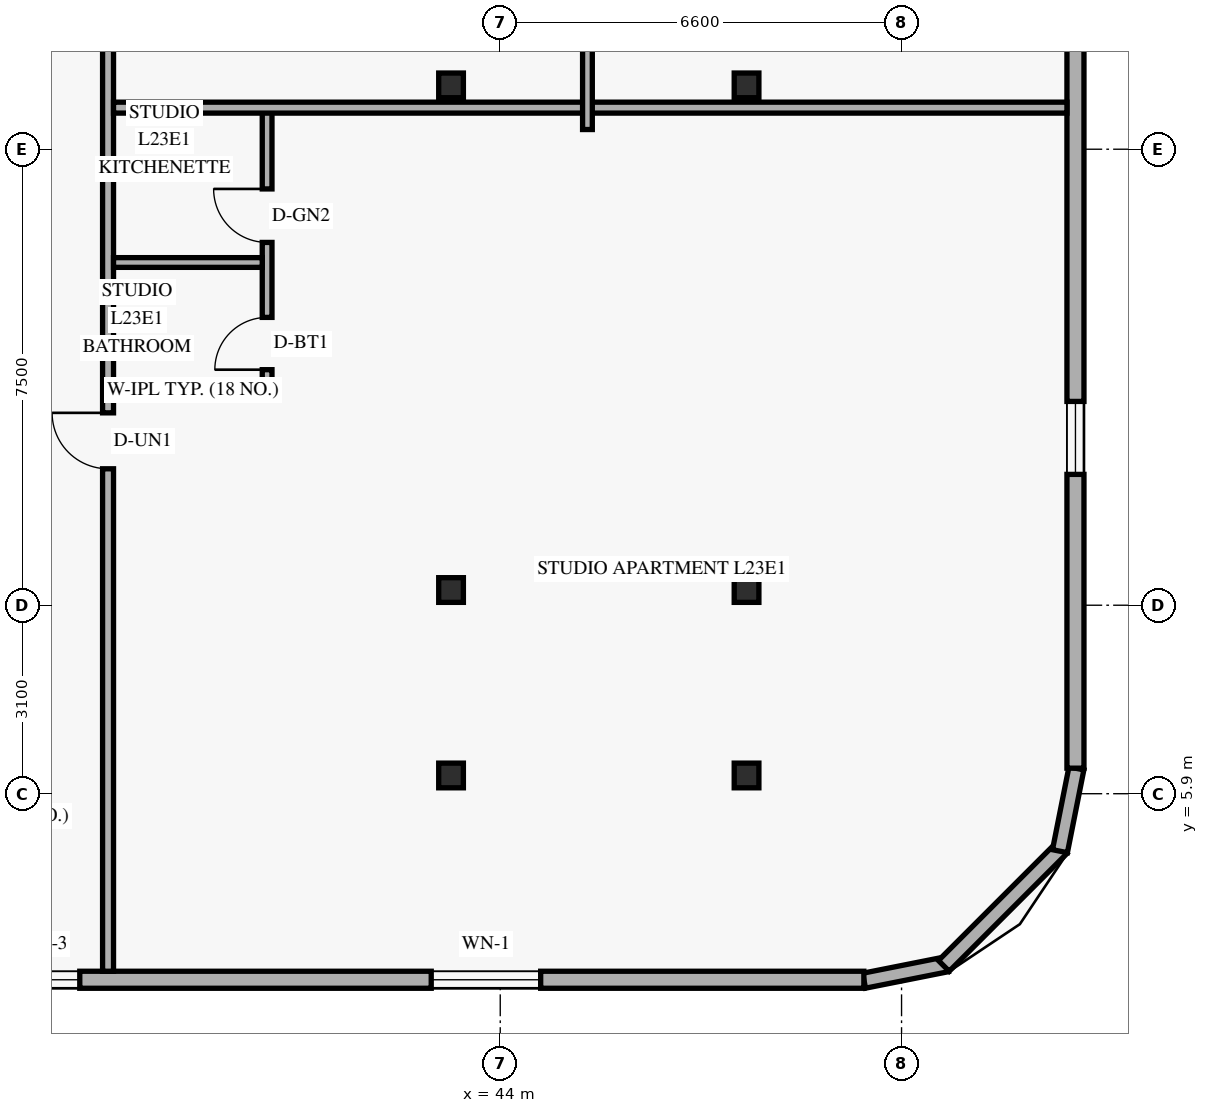
"""IFC4 building model, lengths in metres.
Left out: names, types, materials, properties, quantities, classifications, styles, units other than length and angle.
Written with IfcOpenShell. Run it as: python <this file> out.ifc"""

import sys

from ifc_helpers import new_model, si_unit, direction, frame, frame_2d, origin, origin_2d, place, context, subcontext, project, spatial, rectangle, hollow_rectangle, extrude, element, fill, save


model = new_model("IFC4")
c1 = context("Model", 3, precision=1e-05, world=origin(), true_north=direction((0.0, 1.0)))
c2 = subcontext(c1, "Body", "Model", "MODEL_VIEW")
j1 = project(units=[si_unit("LENGTHUNIT", "METRE"), si_unit("PLANEANGLEUNIT", "RADIAN")], contexts=[c1])
p1 = place(None, origin())
s1 = spatial("IfcSite", under=j1, at=p1, CompositionType="ELEMENT")
p2 = place(p1, origin())
s2 = spatial("IfcBuilding", under=s1, at=p2, CompositionType="ELEMENT")
p3 = place(p2, frame((0.0, 0.0, 91.2)))
s3 = spatial("IfcBuildingStorey", under=s2, at=p3, CompositionType="ELEMENT", Elevation=91.2)
for number, where, z_axis, x_axis in (
    (1, (43.128, 6.2, 0.0), (0.035, 0.0, 0.999), (0.0, 1.0, 0.0)),
    (2, (43.128, 9.25, 0.0), (0.035, 0.0, 0.999), (0.0, 1.0, 0.0)),
    (3, (43.128, 17.55, 0.0), (0.035, 0.0, 0.999), (0.0, 1.0, 0.0)),
):
    element("IfcColumn", number, at=place(p3, frame(where, z_axis=z_axis, x_axis=x_axis)), inside=s3, PredefinedType="COLUMN", context=c2, shape_type="SweptSolid", body=[
        extrude(hollow_rectangle(XDim=0.406, YDim=0.406, WallThickness=0.016, at=origin_2d()), origin(), (0.0, 0.0, 1.0), 3.602),
    ])
for number, where, z_axis, x_axis in (
    (4, (47.946, 6.2, 0.0), (0.058, 0.0, 0.998), (0.0, 1.0, 0.0)),
    (5, (47.946, 9.25, 0.0), (0.058, 0.0, 0.998), (0.0, 1.0, 0.0)),
    (6, (47.946, 17.55, 0.0), (0.058, 0.0, 0.998), (0.0, 1.0, 0.0)),
):
    element("IfcColumn", number, at=place(p3, frame(where, z_axis=z_axis, x_axis=x_axis)), inside=s3, PredefinedType="COLUMN", context=c2, shape_type="SweptSolid", body=[
        extrude(hollow_rectangle(XDim=0.406, YDim=0.406, WallThickness=0.016, at=origin_2d()), origin(), (0.0, 0.0, 1.0), 3.606),
    ])
p4 = place(p3, frame((49.983, 2.824, 0.0), z_axis=(0.0, 0.0, 1.0), x_axis=(0.980809899341, 0.19496651342, 0.0)))
e7 = element("IfcWall", 7, at=p4, inside=s3, PredefinedType="SOLIDWALL", context=c2, shape_type="SweptSolid", body=[
    extrude(rectangle(XDim=1.389, YDim=0.25, at=frame_2d((0.694, 0.0))), origin(), (0.0, 0.0, 1.0), 3.36),
])
p5 = place(p3, frame((51.295, 3.068, 0.0), z_axis=(0.0, 0.0, 1.0), x_axis=(0.707151344399, 0.707062215165, 0.0)))
e8 = element("IfcWall", 8, at=p5, inside=s3, PredefinedType="SOLIDWALL", context=c2, shape_type="SweptSolid", body=[
    extrude(rectangle(XDim=2.739, YDim=0.25, at=frame_2d((1.37, 0.0))), origin(), (0.0, 0.0, 1.0), 3.36),
])
p6 = place(p3, frame((53.205, 4.955, 0.0), z_axis=(0.0, 0.0, 1.0), x_axis=(0.195000137217, 0.980803214965, 0.0)))
e9 = element("IfcWall", 9, at=p6, inside=s3, PredefinedType="SOLIDWALL", context=c2, shape_type="SweptSolid", body=[
    extrude(rectangle(XDim=1.388, YDim=0.25, at=frame_2d((0.694, 0.0))), origin(), (0.0, 0.0, 1.0), 3.36),
])
p7 = place(p3, frame((13.42, 2.84, 0.0), z_axis=(0.0, 0.0, 1.0), x_axis=(1.0, 0.0, 0.0)))
e10 = element("IfcWall", 10, at=p7, inside=s3, PredefinedType="SOLIDWALL", context=c2, shape_type="SweptSolid", body=[
    extrude(rectangle(XDim=36.56, YDim=0.28, at=frame_2d((18.28, 0.0))), origin(), (0.0, 0.0, 1.0), 3.36),
])
p8 = place(p7, frame((3.215, 0.0, 0.85)))
e11 = element("IfcOpeningElement", 11, at=p8, cuts=e10, PredefinedType="OPENING", context=c2, shape_type="SweptSolid", body=[
    extrude(rectangle(XDim=1.8, YDim=1.6, at=frame_2d((0.9, 0.8))), frame((0.0, 0.15, 0.0), z_axis=(0.0, -1.0, 0.0), x_axis=(1.0, 0.0, 0.0)), (0.0, 0.0, 1.0), 0.3),
])
p9 = place(p7, frame((8.68, 0.0, 0.85)))
e12 = element("IfcOpeningElement", 12, at=p9, cuts=e10, PredefinedType="OPENING", context=c2, shape_type="SweptSolid", body=[
    extrude(rectangle(XDim=1.2, YDim=1.5, at=frame_2d((0.6, 0.75))), frame((0.0, 0.15, 0.0), z_axis=(0.0, -1.0, 0.0), x_axis=(1.0, 0.0, 0.0)), (0.0, 0.0, 1.0), 0.3),
])
p10 = place(p7, frame((12.172, 0.0, 0.85)))
e13 = element("IfcOpeningElement", 13, at=p10, cuts=e10, PredefinedType="OPENING", context=c2, shape_type="SweptSolid", body=[
    extrude(rectangle(XDim=1.8, YDim=1.6, at=frame_2d((0.9, 0.8))), frame((0.0, 0.15, 0.0), z_axis=(0.0, -1.0, 0.0), x_axis=(1.0, 0.0, 0.0)), (0.0, 0.0, 1.0), 0.3),
])
p11 = place(p7, frame((18.008, 0.0, 0.85)))
e14 = element("IfcOpeningElement", 14, at=p11, cuts=e10, PredefinedType="OPENING", context=c2, shape_type="SweptSolid", body=[
    extrude(rectangle(XDim=1.8, YDim=1.6, at=frame_2d((0.9, 0.8))), frame((0.0, 0.15, 0.0), z_axis=(0.0, -1.0, 0.0), x_axis=(1.0, 0.0, 0.0)), (0.0, 0.0, 1.0), 0.3),
])
p12 = place(p7, frame((22.465, 0.0, 0.85)))
e15 = element("IfcOpeningElement", 15, at=p12, cuts=e10, PredefinedType="OPENING", context=c2, shape_type="SweptSolid", body=[
    extrude(rectangle(XDim=1.2, YDim=1.5, at=frame_2d((0.6, 0.75))), frame((0.0, 0.15, 0.0), z_axis=(0.0, -1.0, 0.0), x_axis=(1.0, 0.0, 0.0)), (0.0, 0.0, 1.0), 0.3),
])
p13 = place(p7, frame((29.445, 0.0, 0.85)))
e16 = element("IfcOpeningElement", 16, at=p13, cuts=e10, PredefinedType="OPENING", context=c2, shape_type="SweptSolid", body=[
    extrude(rectangle(XDim=1.8, YDim=1.6, at=frame_2d((0.9, 0.8))), frame((0.0, 0.15, 0.0), z_axis=(0.0, -1.0, 0.0), x_axis=(1.0, 0.0, 0.0)), (0.0, 0.0, 1.0), 0.3),
])
p14 = place(p3, frame((53.46, 6.32, 0.0), z_axis=(0.0, 0.0, 1.0), x_axis=(0.0, 1.0, 0.0)))
e17 = element("IfcWall", 17, at=p14, inside=s3, PredefinedType="SOLIDWALL", context=c2, shape_type="SweptSolid", body=[
    extrude(rectangle(XDim=35.36, YDim=0.28, at=frame_2d((17.68, 0.0))), origin(), (0.0, 0.0, 1.0), 3.36),
])
p15 = place(p14, frame((4.832, 0.0, 0.85)))
e18 = element("IfcOpeningElement", 18, at=p15, cuts=e17, PredefinedType="OPENING", context=c2, shape_type="SweptSolid", body=[
    extrude(rectangle(XDim=1.2, YDim=1.5, at=frame_2d((0.6, 0.75))), frame((0.0, 0.15, 0.0), z_axis=(0.0, -1.0, 0.0), x_axis=(1.0, 0.0, 0.0)), (0.0, 0.0, 1.0), 0.3),
])
p16 = place(p14, frame((15.511, 0.0, 0.85)))
e19 = element("IfcOpeningElement", 19, at=p16, cuts=e17, PredefinedType="OPENING", context=c2, shape_type="SweptSolid", body=[
    extrude(rectangle(XDim=1.2, YDim=1.5, at=frame_2d((0.6, 0.75))), frame((0.0, 0.15, 0.0), z_axis=(0.0, -1.0, 0.0), x_axis=(1.0, 0.0, 0.0)), (0.0, 0.0, 1.0), 0.3),
])
p17 = place(p14, frame((22.753, 0.0, 0.85)))
e20 = element("IfcOpeningElement", 20, at=p17, cuts=e17, PredefinedType="OPENING", context=c2, shape_type="SweptSolid", body=[
    extrude(rectangle(XDim=1.2, YDim=1.5, at=frame_2d((0.6, 0.75))), frame((0.0, 0.15, 0.0), z_axis=(0.0, -1.0, 0.0), x_axis=(1.0, 0.0, 0.0)), (0.0, 0.0, 1.0), 0.3),
])
p18 = place(p14, frame((29.754, 0.0, 0.85)))
e21 = element("IfcOpeningElement", 21, at=p18, cuts=e17, PredefinedType="OPENING", context=c2, shape_type="SweptSolid", body=[
    extrude(rectangle(XDim=1.2, YDim=1.5, at=frame_2d((0.6, 0.75))), frame((0.0, 0.15, 0.0), z_axis=(0.0, -1.0, 0.0), x_axis=(1.0, 0.0, 0.0)), (0.0, 0.0, 1.0), 0.3),
])
p19 = place(p3, frame((37.55, 2.98, 0.0), z_axis=(0.0, 0.0, 1.0), x_axis=(0.0, 1.0, 0.0)))
e22 = element("IfcWall", 22, at=p19, inside=s3, PredefinedType="STANDARD", context=c2, shape_type="SweptSolid", body=[
    extrude(rectangle(XDim=42.04, YDim=0.18, at=frame_2d((21.02, 0.0))), origin(), (0.0, 0.0, 1.0), 2.731),
])
p20 = place(p19, frame((8.264, 0.0, 0.0)))
e23 = element("IfcOpeningElement", 23, at=p20, cuts=e22, PredefinedType="OPENING", context=c2, shape_type="SweptSolid", body=[
    extrude(rectangle(XDim=0.92, YDim=2.15, at=frame_2d((0.46, 1.075))), frame((0.0, 0.1, 0.0), z_axis=(0.0, -1.0, 0.0), x_axis=(1.0, 0.0, 0.0)), (0.0, 0.0, 1.0), 0.2),
])
p21 = place(p19, frame((18.691, 0.0, 0.0)))
e24 = element("IfcOpeningElement", 24, at=p21, cuts=e22, PredefinedType="OPENING", context=c2, shape_type="SweptSolid", body=[
    extrude(rectangle(XDim=0.92, YDim=2.15, at=frame_2d((0.46, 1.075))), frame((0.0, 0.1, 0.0), z_axis=(0.0, -1.0, 0.0), x_axis=(1.0, 0.0, 0.0)), (0.0, 0.0, 1.0), 0.2),
])
p22 = place(p19, frame((32.494, 0.0, 0.0)))
e25 = element("IfcOpeningElement", 25, at=p22, cuts=e22, PredefinedType="OPENING", context=c2, shape_type="SweptSolid", body=[
    extrude(rectangle(XDim=0.92, YDim=2.15, at=frame_2d((0.46, 1.075))), frame((0.0, 0.1, 0.0), z_axis=(0.0, -1.0, 0.0), x_axis=(1.0, 0.0, 0.0)), (0.0, 0.0, 1.0), 0.2),
])
p23 = place(p3, frame((37.64, 12.544, 0.0), z_axis=(0.0, 0.0, 1.0), x_axis=(1.0, 0.0, 0.0)))
e26 = element("IfcWall", 26, at=p23, inside=s3, PredefinedType="PLUMBINGWALL", context=c2, shape_type="SweptSolid", body=[
    extrude(rectangle(XDim=2.606, YDim=0.16, at=frame_2d((1.303, 0.0))), origin(), (0.0, 0.0, 1.0), 3.36),
])
p24 = place(p3, frame((40.166, 12.454, 0.0), z_axis=(0.0, 0.0, 1.0), x_axis=(0.0, 1.0, 0.0)))
e27 = element("IfcWall", 27, at=p24, inside=s3, PredefinedType="PLUMBINGWALL", context=c2, shape_type="SweptSolid", body=[
    extrude(rectangle(XDim=4.73, YDim=0.16, at=frame_2d((2.365, 0.0))), origin(), (0.0, 0.0, 1.0), 2.988),
])
p25 = place(p24, frame((0.42, 0.0, 0.0)))
e28 = element("IfcOpeningElement", 28, at=p25, cuts=e27, PredefinedType="OPENING", context=c2, shape_type="SweptSolid", body=[
    extrude(rectangle(XDim=0.86, YDim=2.12, at=frame_2d((0.43, 1.06))), frame((0.0, 0.09, 0.0), z_axis=(0.0, -1.0, 0.0), x_axis=(1.0, 0.0, 0.0)), (0.0, 0.0, 1.0), 0.18),
])
p26 = place(p24, frame((2.513, 0.0, 0.0)))
e29 = element("IfcOpeningElement", 29, at=p26, cuts=e27, PredefinedType="OPENING", context=c2, shape_type="SweptSolid", body=[
    extrude(rectangle(XDim=0.88, YDim=2.12, at=frame_2d((0.44, 1.06))), frame((0.0, 0.09, 0.0), z_axis=(0.0, -1.0, 0.0), x_axis=(1.0, 0.0, 0.0)), (0.0, 0.0, 1.0), 0.18),
])
p27 = place(p3, frame((37.64, 14.637, 0.0), z_axis=(0.0, 0.0, 1.0), x_axis=(1.0, 0.0, 0.0)))
e30 = element("IfcWall", 30, at=p27, inside=s3, PredefinedType="PLUMBINGWALL", context=c2, shape_type="SweptSolid", body=[
    extrude(rectangle(XDim=2.446, YDim=0.16, at=frame_2d((1.223, 0.0))), origin(), (0.0, 0.0, 1.0), 3.36),
])
p28 = place(p3, frame((37.64, 17.184, 0.0), z_axis=(0.0, 0.0, 1.0), x_axis=(1.0, 0.0, 0.0)))
e31 = element("IfcWall", 31, at=p28, inside=s3, PredefinedType="PARTITIONING", context=c2, shape_type="SweptSolid", body=[
    extrude(rectangle(XDim=15.68, YDim=0.18, at=frame_2d((7.84, 0.0))), origin(), (0.0, 0.0, 1.0), 2.731),
])
p29 = place(p3, frame((45.434, 16.824, 0.0), z_axis=(0.0, 0.0, 1.0), x_axis=(0.0, 1.0, 0.0)))
e32 = element("IfcWall", 32, at=p29, inside=s3, PredefinedType="PARTITIONING", context=c2, shape_type="SweptSolid", body=[
    extrude(rectangle(XDim=10.934, YDim=0.16, at=frame_2d((5.467, 0.0))), origin(), (0.0, 0.0, 1.0), 2.731),
])
p30 = place(p29, frame((4.707, 0.0, 0.0)))
e33 = element("IfcOpeningElement", 33, at=p30, cuts=e32, PredefinedType="OPENING", context=c2, shape_type="SweptSolid", body=[
    extrude(rectangle(XDim=0.95, YDim=2.15, at=frame_2d((0.475, 1.075))), frame((0.0, 0.09, 0.0), z_axis=(0.0, -1.0, 0.0), x_axis=(1.0, 0.0, 0.0)), (0.0, 0.0, 1.0), 0.18),
])
p31 = place(p12, origin())
e34 = element("IfcWindow", 34, at=p31, inside=s3, PartitioningType="SINGLE_PANEL", PredefinedType="WINDOW", context=c2, shape_type="SweptSolid", body=[
    extrude(rectangle(XDim=1.2, YDim=1.5, at=frame_2d((0.6, 0.75))), frame((0.0, 0.03, 0.0), z_axis=(0.0, -1.0, 0.0), x_axis=(1.0, 0.0, 0.0)), (0.0, 0.0, 1.0), 0.06),
])
fill(e15, e34)
p32 = place(p13, origin())
e35 = element("IfcWindow", 35, at=p32, inside=s3, PartitioningType="SINGLE_PANEL", PredefinedType="WINDOW", context=c2, shape_type="SweptSolid", body=[
    extrude(rectangle(XDim=1.8, YDim=1.6, at=frame_2d((0.9, 0.8))), frame((0.0, 0.03, 0.0), z_axis=(0.0, -1.0, 0.0), x_axis=(1.0, 0.0, 0.0)), (0.0, 0.0, 1.0), 0.06),
])
fill(e16, e35)
p33 = place(p15, origin())
e36 = element("IfcWindow", 36, at=p33, inside=s3, PartitioningType="SINGLE_PANEL", PredefinedType="WINDOW", context=c2, shape_type="SweptSolid", body=[
    extrude(rectangle(XDim=1.2, YDim=1.5, at=frame_2d((0.6, 0.75))), frame((0.0, 0.03, 0.0), z_axis=(0.0, -1.0, 0.0), x_axis=(1.0, 0.0, 0.0)), (0.0, 0.0, 1.0), 0.06),
])
fill(e18, e36)
p34 = place(p20, origin())
e37 = element("IfcDoor", 37, at=p34, inside=s3, OperationType="SINGLE_SWING_RIGHT", PredefinedType="DOOR", context=c2, shape_type="SweptSolid", body=[
    extrude(rectangle(XDim=0.92, YDim=2.15, at=frame_2d((0.46, 1.075))), frame((0.0, 0.025, 0.0), z_axis=(0.0, -1.0, 0.0), x_axis=(1.0, 0.0, 0.0)), (0.0, 0.0, 1.0), 0.05),
])
fill(e23, e37)
p35 = place(p25, origin())
e38 = element("IfcDoor", 38, at=p35, inside=s3, OperationType="SINGLE_SWING_LEFT", PredefinedType="DOOR", context=c2, shape_type="SweptSolid", body=[
    extrude(rectangle(XDim=0.86, YDim=2.12, at=frame_2d((0.43, 1.06))), frame((0.0, 0.025, 0.0), z_axis=(0.0, -1.0, 0.0), x_axis=(1.0, 0.0, 0.0)), (0.0, 0.0, 1.0), 0.05),
])
fill(e28, e38)
p36 = place(p26, origin())
e39 = element("IfcDoor", 39, at=p36, inside=s3, OperationType="SINGLE_SWING_RIGHT", PredefinedType="DOOR", context=c2, shape_type="SweptSolid", body=[
    extrude(rectangle(XDim=0.88, YDim=2.12, at=frame_2d((0.44, 1.06))), frame((0.0, 0.025, 0.0), z_axis=(0.0, -1.0, 0.0), x_axis=(1.0, 0.0, 0.0)), (0.0, 0.0, 1.0), 0.05),
])
fill(e29, e39)
save(model, sys.argv[1])
